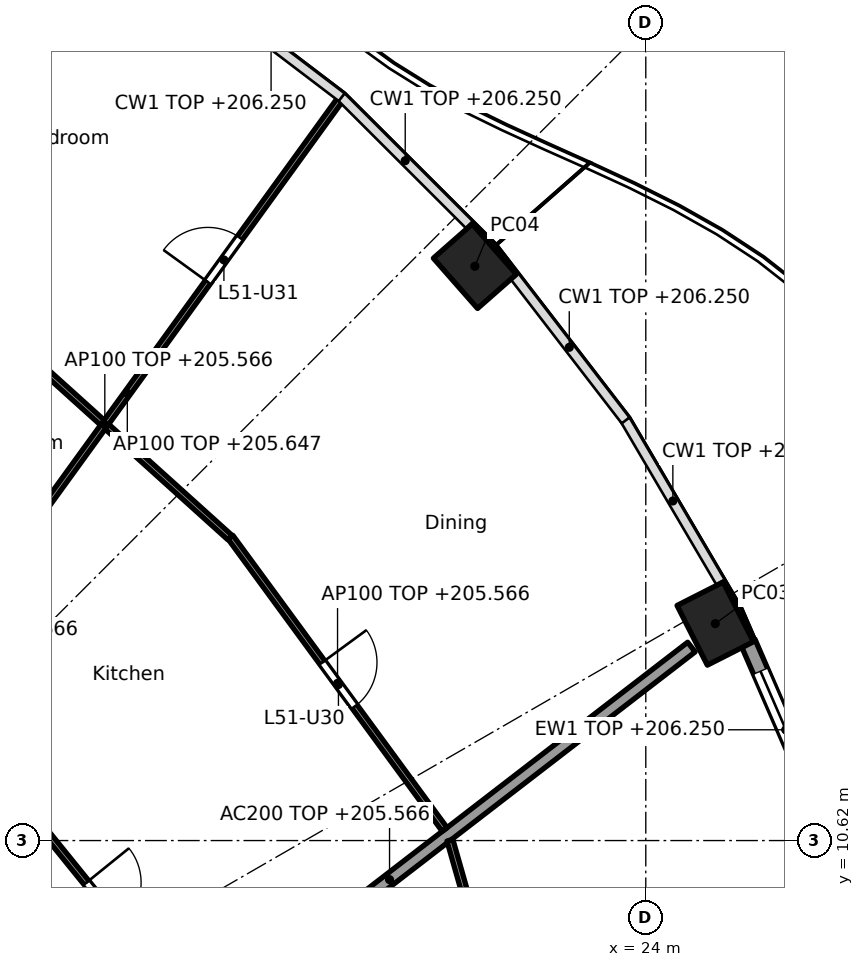
"""IFC4 building model, lengths in metres.
Left out: names, types, materials, properties, quantities, classifications, styles, units other than length and angle.
Written with IfcOpenShell. Run it as: python <this file> out.ifc"""

import sys

from ifc_helpers import new_model, si_unit, direction, frame, frame_2d, origin, origin_2d, place, context, subcontext, project, spatial, rectangle, hollow_rectangle, extrude, element, fill, save


model = new_model("IFC4")
c1 = context("Model", 3, precision=1e-05, world=origin(), true_north=direction((0.0, 1.0)))
c2 = subcontext(c1, "Body", "Model", "MODEL_VIEW")
j1 = project(units=[si_unit("LENGTHUNIT", "METRE"), si_unit("PLANEANGLEUNIT", "RADIAN")], contexts=[c1])
p1 = place(None, origin())
s1 = spatial("IfcSite", under=j1, at=p1, CompositionType="ELEMENT")
p2 = place(p1, origin())
s2 = spatial("IfcBuilding", under=s1, at=p2, CompositionType="ELEMENT")
p3 = place(p2, frame((0.0, 0.0, 202.9)))
s3 = spatial("IfcBuildingStorey", under=s2, at=p3, CompositionType="ELEMENT", Elevation=202.9)
for number, where, z_axis, x_axis in (
    (1, (25.142, 14.188, 0.0), (0.0, 0.0, 1.0), (-0.452, 0.892, 0.0)),
    (2, (21.189, 20.064, 0.0), (0.0, 0.0, 1.0), (-0.66, 0.751, 0.0)),
):
    element("IfcColumn", number, at=place(p3, frame(where, z_axis=z_axis, x_axis=x_axis)), inside=s3, PredefinedType="COLUMN", context=c2, shape_type="SweptSolid", body=[
        extrude(hollow_rectangle(XDim=1.1, YDim=0.85, WallThickness=0.036, at=origin_2d()), origin(), (0.0, 0.0, 1.0), 3.7),
    ])
p4 = place(p3, frame((25.679, 13.883, 0.0), z_axis=(0.0, 0.0, 1.0), x_axis=(0.397620521824, -0.917549955384, 0.0)))
e3 = element("IfcWall", 3, at=p4, inside=s3, PredefinedType="SOLIDWALL", context=c2, shape_type="SweptSolid", body=[
    extrude(rectangle(XDim=3.142, YDim=0.25, at=frame_2d((1.571, 0.0))), origin(), (0.0, 0.0, 1.0), 3.35),
])
p5 = place(p4, frame((0.521, 0.0, 0.0)))
e4 = element("IfcOpeningElement", 4, at=p5, cuts=e3, PredefinedType="OPENING", context=c2, shape_type="SweptSolid", body=[
    extrude(rectangle(XDim=2.1, YDim=2.4, at=frame_2d((1.05, 1.2))), frame((0.0, 0.135, 0.0), z_axis=(0.0, -1.0, 0.0), x_axis=(1.0, 0.0, 0.0)), (0.0, 0.0, 1.0), 0.27),
])
p6 = place(p3, frame((14.822, 6.154, 0.0), z_axis=(0.0, 0.0, 1.0), x_axis=(0.792203056092, 0.610257583254, 0.0)))
e5 = element("IfcWall", 5, at=p6, inside=s3, PredefinedType="PARTITIONING", context=c2, shape_type="SweptSolid", body=[
    extrude(rectangle(XDim=12.533, YDim=0.2, at=frame_2d((6.266, 0.0))), origin(), (0.0, 0.0, 1.0), 2.666),
])
p7 = place(p3, frame((22.189, 5.67, 0.0), z_axis=(0.0, 0.0, 1.0), x_axis=(-0.273819702124, 0.961781040949, 0.0)))
e6 = element("IfcWall", 6, at=p7, inside=s3, PredefinedType="PARTITIONING", context=c2, shape_type="SweptSolid", body=[
    extrude(rectangle(XDim=5.152, YDim=0.1, at=frame_2d((2.576, 0.0))), origin(), (0.0, 0.0, 1.0), 2.666),
])
p8 = place(p7, frame((3.426, 0.0, 0.0)))
e7 = element("IfcOpeningElement", 7, at=p8, cuts=e6, PredefinedType="OPENING", context=c2, shape_type="SweptSolid", body=[
    extrude(rectangle(XDim=0.9, YDim=2.1, at=frame_2d((0.45, 1.05))), frame((0.0, 0.06, 0.0), z_axis=(0.0, -1.0, 0.0), x_axis=(1.0, 0.0, 0.0)), (0.0, 0.0, 1.0), 0.12),
])
p9 = place(p3, frame((16.626, 7.67, 0.0), z_axis=(0.0, 0.0, 1.0), x_axis=(-0.628764602857, 0.777595700987, 0.0)))
e8 = element("IfcWall", 8, at=p9, inside=s3, PredefinedType="PARTITIONING", context=c2, shape_type="SweptSolid", body=[
    extrude(rectangle(XDim=4.957, YDim=0.1, at=frame_2d((2.479, 0.0))), origin(), (0.0, 0.0, 1.0), 2.666),
])
p10 = place(p9, frame((2.004, 0.0, 0.0)))
e9 = element("IfcOpeningElement", 9, at=p10, cuts=e8, PredefinedType="OPENING", context=c2, shape_type="SweptSolid", body=[
    extrude(rectangle(XDim=0.9, YDim=2.1, at=frame_2d((0.45, 1.05))), frame((0.0, 0.06, 0.0), z_axis=(0.0, -1.0, 0.0), x_axis=(1.0, 0.0, 0.0)), (0.0, 0.0, 1.0), 0.12),
])
p11 = place(p3, frame((20.692, 10.802, 0.0), z_axis=(0.0, 0.0, 1.0), x_axis=(-0.591122127251, 0.806582066918, 0.0)))
e10 = element("IfcWall", 10, at=p11, inside=s3, PredefinedType="PARTITIONING", context=c2, shape_type="SweptSolid", body=[
    extrude(rectangle(XDim=5.96, YDim=0.1, at=frame_2d((2.98, 0.0))), origin(), (0.0, 0.0, 1.0), 2.666),
])
p12 = place(p11, frame((2.505, 0.0, 0.0)))
e11 = element("IfcOpeningElement", 11, at=p12, cuts=e10, PredefinedType="OPENING", context=c2, shape_type="SweptSolid", body=[
    extrude(rectangle(XDim=0.9, YDim=2.1, at=frame_2d((0.45, 1.05))), frame((0.0, 0.06, 0.0), z_axis=(0.0, -1.0, 0.0), x_axis=(1.0, 0.0, 0.0)), (0.0, 0.0, 1.0), 0.12),
])
p13 = place(p3, frame((17.162, 15.603, 0.0), z_axis=(0.0, 0.0, 1.0), x_axis=(-0.742790086539, 0.66952437397, 0.0)))
e12 = element("IfcWall", 12, at=p13, inside=s3, PredefinedType="PARTITIONING", context=c2, shape_type="SweptSolid", body=[
    extrude(rectangle(XDim=5.542, YDim=0.1, at=frame_2d((2.771, 0.0))), origin(), (0.0, 0.0, 1.0), 2.666),
])
p14 = place(p3, frame((11.923, 13.073, 0.0), z_axis=(0.0, 0.0, 1.0), x_axis=(0.586643945506, 0.809844973561, 0.0)))
e13 = element("IfcWall", 13, at=p14, inside=s3, PredefinedType="PARTITIONING", context=c2, shape_type="SweptSolid", body=[
    extrude(rectangle(XDim=12.104, YDim=0.1, at=frame_2d((6.052, 0.0))), origin(), (0.0, 0.0, 1.0), 2.747),
])
p15 = place(p14, frame((8.31, 0.0, 0.0)))
e14 = element("IfcOpeningElement", 14, at=p15, cuts=e13, PredefinedType="OPENING", context=c2, shape_type="SweptSolid", body=[
    extrude(rectangle(XDim=0.9, YDim=2.1, at=frame_2d((0.45, 1.05))), frame((0.0, 0.06, 0.0), z_axis=(0.0, -1.0, 0.0), x_axis=(1.0, 0.0, 0.0)), (0.0, 0.0, 1.0), 0.12),
])
p16 = place(p5, origin())
e15 = element("IfcDoor", 15, at=p16, inside=s3, OperationType="SLIDING_TO_LEFT", PredefinedType="DOOR", context=c2, shape_type="SweptSolid", body=[
    extrude(rectangle(XDim=2.1, YDim=2.4, at=frame_2d((1.05, 1.2))), frame((0.0, 0.025, 0.0), z_axis=(0.0, -1.0, 0.0), x_axis=(1.0, 0.0, 0.0)), (0.0, 0.0, 1.0), 0.05),
])
fill(e4, e15)
p17 = place(p10, frame((0.9, 0.0, 0.0), x_axis=(-1.0, 0.0, 0.0)))
e16 = element("IfcDoor", 16, at=p17, inside=s3, OperationType="SINGLE_SWING_LEFT", PredefinedType="DOOR", context=c2, shape_type="SweptSolid", body=[
    extrude(rectangle(XDim=0.9, YDim=2.1, at=frame_2d((0.45, 1.05))), frame((0.0, 0.025, 0.0), z_axis=(0.0, -1.0, 0.0), x_axis=(1.0, 0.0, 0.0)), (0.0, 0.0, 1.0), 0.05),
])
fill(e9, e16)
p18 = place(p12, frame((0.9, 0.0, 0.0), x_axis=(-1.0, 0.0, 0.0)))
e17 = element("IfcDoor", 17, at=p18, inside=s3, OperationType="SINGLE_SWING_LEFT", PredefinedType="DOOR", context=c2, shape_type="SweptSolid", body=[
    extrude(rectangle(XDim=0.9, YDim=2.1, at=frame_2d((0.45, 1.05))), frame((0.0, 0.025, 0.0), z_axis=(0.0, -1.0, 0.0), x_axis=(1.0, 0.0, 0.0)), (0.0, 0.0, 1.0), 0.05),
])
fill(e11, e17)
p19 = place(p15, origin())
e18 = element("IfcDoor", 18, at=p19, inside=s3, OperationType="SINGLE_SWING_LEFT", PredefinedType="DOOR", context=c2, shape_type="SweptSolid", body=[
    extrude(rectangle(XDim=0.9, YDim=2.1, at=frame_2d((0.45, 1.05))), frame((0.0, 0.025, 0.0), z_axis=(0.0, -1.0, 0.0), x_axis=(1.0, 0.0, 0.0)), (0.0, 0.0, 1.0), 0.05),
])
fill(e14, e18)
save(model, sys.argv[1])
